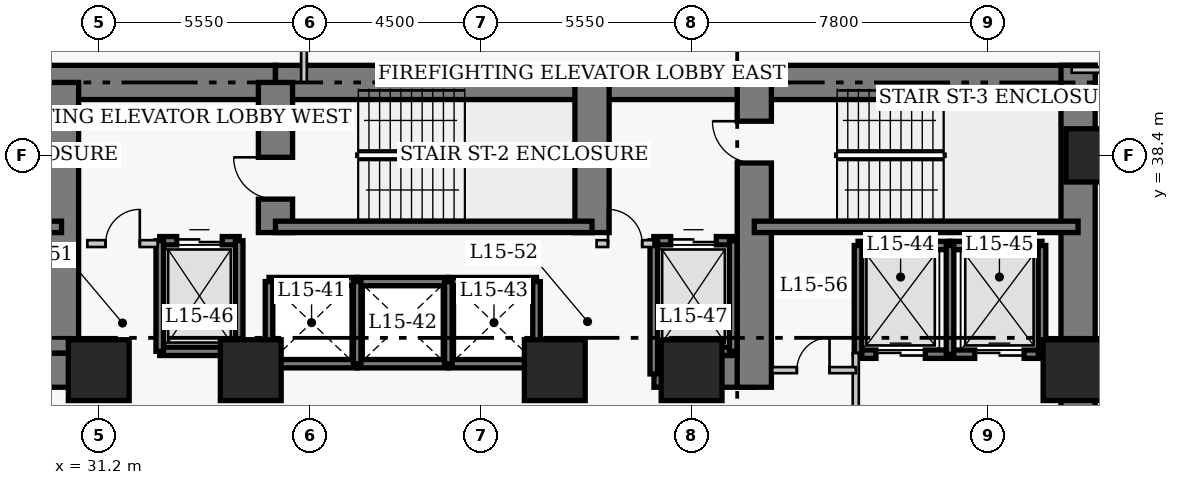
"""IFC4 building model, lengths in metres.
Left out: names, types, materials, properties, quantities, classifications, styles, units other than length and angle.
Written with IfcOpenShell. Run it as: python <this file> out.ifc"""

import sys

from ifc_helpers import new_model, si_unit, direction, frame, frame_2d, origin, origin_2d, place, context, subcontext, project, spatial, rectangle, extrude, element, fill, save


model = new_model("IFC4")
c1 = context("Model", 3, precision=1e-05, world=origin(), true_north=direction((0.0, 1.0)))
c2 = subcontext(c1, "Body", "Model", "MODEL_VIEW")
j1 = project(units=[si_unit("LENGTHUNIT", "METRE"), si_unit("PLANEANGLEUNIT", "RADIAN")], contexts=[c1])
p1 = place(None, origin())
s1 = spatial("IfcSite", under=j1, at=p1, CompositionType="ELEMENT")
p2 = place(p1, origin())
s2 = spatial("IfcBuilding", under=s1, at=p2, CompositionType="ELEMENT")
p3 = place(p2, frame((0.0, 0.0, 64.0)))
s3 = spatial("IfcBuildingStorey", under=s2, at=p3, CompositionType="ELEMENT", Elevation=64.0)
p4 = place(p3, frame((21.45, 40.32, 0.0), z_axis=(0.0, 0.0, 1.0), x_axis=(1.0, 0.0, 0.0)))
e1 = element("IfcWall", 1, at=p4, inside=s3, PredefinedType="SHEAR", context=c2, shape_type="SweptSolid", body=[
    extrude(rectangle(XDim=14.4, YDim=0.9, at=frame_2d((7.2, 0.0))), origin(), (0.0, 0.0, 1.0), 3.8),
])
p5 = place(p3, frame((35.85, 40.32, 0.0), z_axis=(0.0, 0.0, 1.0), x_axis=(1.0, 0.0, 0.0)))
e2 = element("IfcWall", 2, at=p5, inside=s3, PredefinedType="SHEAR", context=c2, shape_type="SweptSolid", body=[
    extrude(rectangle(XDim=12.6, YDim=0.9, at=frame_2d((6.3, 0.0))), origin(), (0.0, 0.0, 1.0), 3.8),
])
p6 = place(p3, frame((48.45, 40.32, 0.0), z_axis=(0.0, 0.0, 1.0), x_axis=(1.0, 0.0, 0.0)))
e3 = element("IfcWall", 3, at=p6, inside=s3, PredefinedType="SHEAR", context=c2, shape_type="SweptSolid", body=[
    extrude(rectangle(XDim=8.97, YDim=0.9, at=frame_2d((4.485, 0.0))), origin(), (0.0, 0.0, 1.0), 3.8),
])
p7 = place(p3, frame((56.97, 27.05, 0.0), z_axis=(0.0, 0.0, 1.0), x_axis=(0.0, 1.0, 0.0)))
e4 = element("IfcWall", 4, at=p7, inside=s3, PredefinedType="SHEAR", context=c2, shape_type="SweptSolid", body=[
    extrude(rectangle(XDim=13.72, YDim=0.9, at=frame_2d((6.86, 0.0))), origin(), (0.0, 0.0, 1.0), 3.8),
])
p8 = place(p3, frame((28.45, 32.75, 0.0), z_axis=(0.0, 0.0, 1.0), x_axis=(1.0, 0.0, 0.0)))
e5 = element("IfcWall", 5, at=p8, inside=s3, PredefinedType="SHEAR", context=c2, shape_type="SweptSolid", body=[
    extrude(rectangle(XDim=2.4, YDim=0.9, at=frame_2d((1.2, 0.0))), origin(), (0.0, 0.0, 1.0), 3.8),
])
p9 = place(p3, frame((45.81, 32.75, 0.0), z_axis=(0.0, 0.0, 1.0), x_axis=(1.0, 0.0, 0.0)))
e6 = element("IfcWall", 6, at=p9, inside=s3, PredefinedType="SHEAR", context=c2, shape_type="SweptSolid", body=[
    extrude(rectangle(XDim=2.64, YDim=0.9, at=frame_2d((1.32, 0.0))), origin(), (0.0, 0.0, 1.0), 3.8),
])
p10 = place(p3, frame((30.22, 33.2, 0.0), z_axis=(0.0, 0.0, 1.0), x_axis=(0.0, 1.0, 0.0)))
e7 = element("IfcWall", 7, at=p10, inside=s3, PredefinedType="SHEAR", context=c2, shape_type="SweptSolid", body=[
    extrude(rectangle(XDim=7.12, YDim=0.9, at=frame_2d((3.56, 0.0))), origin(), (0.0, 0.0, 1.0), 3.8),
])
p11 = place(p3, frame((35.85, 36.37, 0.0), z_axis=(0.0, 0.0, 1.0), x_axis=(0.0, 1.0, 0.0)))
e8 = element("IfcWall", 8, at=p11, inside=s3, PredefinedType="SHEAR", context=c2, shape_type="SweptSolid", body=[
    extrude(rectangle(XDim=3.95, YDim=0.9, at=frame_2d((1.975, 0.0))), origin(), (0.0, 0.0, 1.0), 3.8),
])
p12 = place(p11, frame((0.88, 0.0, 0.0)))
e9 = element("IfcOpeningElement", 9, at=p12, cuts=e8, PredefinedType="OPENING", context=c2, shape_type="SweptSolid", body=[
    extrude(rectangle(XDim=1.1, YDim=2.15, at=frame_2d((0.55, 1.075))), frame((0.0, 0.46, 0.0), z_axis=(0.0, -1.0, 0.0), x_axis=(1.0, 0.0, 0.0)), (0.0, 0.0, 1.0), 0.92),
])
p13 = place(p3, frame((44.18, 36.37, 0.0), z_axis=(0.0, 0.0, 1.0), x_axis=(0.0, 1.0, 0.0)))
e10 = element("IfcWall", 10, at=p13, inside=s3, PredefinedType="SHEAR", context=c2, shape_type="SweptSolid", body=[
    extrude(rectangle(XDim=3.95, YDim=0.9, at=frame_2d((1.975, 0.0))), origin(), (0.0, 0.0, 1.0), 3.8),
])
p14 = place(p3, frame((48.45, 32.3, 0.0), z_axis=(0.0, 0.0, 1.0), x_axis=(0.0, 1.0, 0.0)))
e11 = element("IfcWall", 11, at=p14, inside=s3, PredefinedType="SHEAR", context=c2, shape_type="SweptSolid", body=[
    extrude(rectangle(XDim=8.02, YDim=0.9, at=frame_2d((4.01, 0.0))), origin(), (0.0, 0.0, 1.0), 3.8),
])
p15 = place(p14, frame((5.9, 0.0, 0.0)))
e12 = element("IfcOpeningElement", 12, at=p15, cuts=e11, PredefinedType="OPENING", context=c2, shape_type="SweptSolid", body=[
    extrude(rectangle(XDim=1.1, YDim=2.15, at=frame_2d((0.55, 1.075))), frame((0.0, 0.46, 0.0), z_axis=(0.0, -1.0, 0.0), x_axis=(1.0, 0.0, 0.0)), (0.0, 0.0, 1.0), 0.92),
])
p16 = place(p3, frame((21.9, 36.52, 0.0), z_axis=(0.0, 0.0, 1.0), x_axis=(1.0, 0.0, 0.0)))
e13 = element("IfcWall", 13, at=p16, inside=s3, PredefinedType="SHEAR", context=c2, shape_type="SweptSolid", body=[
    extrude(rectangle(XDim=8.32, YDim=0.3, at=frame_2d((4.16, 0.0))), origin(), (0.0, 0.0, 1.0), 3.8),
])
p17 = place(p16, frame((0.9, 0.0, 0.0)))
e14 = element("IfcOpeningElement", 14, at=p17, cuts=e13, PredefinedType="OPENING", context=c2, shape_type="SweptSolid", body=[
    extrude(rectangle(XDim=1.1, YDim=2.15, at=frame_2d((0.55, 1.075))), frame((0.0, 0.16, 0.0), z_axis=(0.0, -1.0, 0.0), x_axis=(1.0, 0.0, 0.0)), (0.0, 0.0, 1.0), 0.32),
])
p18 = place(p3, frame((35.85, 36.52, 0.0), z_axis=(0.0, 0.0, 1.0), x_axis=(1.0, 0.0, 0.0)))
e15 = element("IfcWall", 15, at=p18, inside=s3, PredefinedType="SHEAR", context=c2, shape_type="SweptSolid", body=[
    extrude(rectangle(XDim=8.33, YDim=0.3, at=frame_2d((4.165, 0.0))), origin(), (0.0, 0.0, 1.0), 3.8),
])
p19 = place(p3, frame((48.45, 36.52, 0.0), z_axis=(0.0, 0.0, 1.0), x_axis=(1.0, 0.0, 0.0)))
e16 = element("IfcWall", 16, at=p19, inside=s3, PredefinedType="SHEAR", context=c2, shape_type="SweptSolid", body=[
    extrude(rectangle(XDim=8.52, YDim=0.3, at=frame_2d((4.26, 0.0))), origin(), (0.0, 0.0, 1.0), 3.8),
])
p20 = place(p3, frame((57.35, 38.4, 0.0), z_axis=(0.0, 0.0, 1.0), x_axis=(1.0, 0.0, 0.0)))
e17 = element("IfcColumn", 17, at=p20, inside=s3, PredefinedType="COLUMN", context=c2, shape_type="SweptSolid", body=[
    extrude(rectangle(XDim=1.4, YDim=1.4, at=origin_2d()), origin(), (0.0, 0.0, 1.0), 3.8),
])
for number, where, z_axis, x_axis in (
    (18, (31.2, 32.75, 0.0), (0.0, 0.0, 1.0), (1.0, 0.0, 0.0)),
    (19, (35.2, 32.75, 0.0), (0.0, 0.0, 1.0), (1.0, 0.0, 0.0)),
    (20, (43.2, 32.75, 0.0), (0.0, 0.0, 1.0), (1.0, 0.0, 0.0)),
    (21, (46.8, 32.75, 0.0), (0.0, 0.0, 1.0), (1.0, 0.0, 0.0)),
    (22, (56.85, 32.75, 0.0), (0.0, 0.0, 1.0), (1.0, 0.0, 0.0)),
):
    element("IfcColumn", number, at=place(p3, frame(where, z_axis=z_axis, x_axis=x_axis)), inside=s3, PredefinedType="COLUMN", context=c2, shape_type="SweptSolid", body=[
        extrude(rectangle(XDim=1.6, YDim=1.6, at=origin_2d()), origin(), (0.0, 0.0, 1.0), 3.8),
    ])
for number, where, z_axis, x_axis in (
    (23, (35.68, 35.08, 0.0), (0.0, 0.0, 1.0), (1.0, 0.0, 0.0)),
    (24, (35.68, 32.92, 0.0), (0.0, 0.0, 1.0), (1.0, 0.0, 0.0)),
):
    element("IfcWall", number, at=place(p3, frame(where, z_axis=z_axis, x_axis=x_axis)), inside=s3, PredefinedType="SHEAR", context=c2, shape_type="SweptSolid", body=[
        extrude(rectangle(XDim=2.32, YDim=0.22, at=frame_2d((1.16, 0.0))), origin(), (0.0, 0.0, 1.0), 3.8),
    ])
p21 = place(p3, frame((35.68, 32.92, 0.0), z_axis=(0.0, 0.0, 1.0), x_axis=(0.0, 1.0, 0.0)))
e25 = element("IfcWall", 25, at=p21, inside=s3, PredefinedType="SHEAR", context=c2, shape_type="SweptSolid", body=[
    extrude(rectangle(XDim=2.16, YDim=0.2, at=frame_2d((1.08, 0.0))), origin(), (0.0, 0.0, 1.0), 3.8),
])
for number, where, z_axis, x_axis in (
    (26, (38.0, 35.08, 0.0), (0.0, 0.0, 1.0), (1.0, 0.0, 0.0)),
    (27, (38.0, 32.92, 0.0), (0.0, 0.0, 1.0), (1.0, 0.0, 0.0)),
):
    element("IfcWall", number, at=place(p3, frame(where, z_axis=z_axis, x_axis=x_axis)), inside=s3, PredefinedType="SHEAR", context=c2, shape_type="SweptSolid", body=[
        extrude(rectangle(XDim=2.4, YDim=0.22, at=frame_2d((1.2, 0.0))), origin(), (0.0, 0.0, 1.0), 3.8),
    ])
p22 = place(p3, frame((38.0, 32.92, 0.0), z_axis=(0.0, 0.0, 1.0), x_axis=(0.0, 1.0, 0.0)))
e28 = element("IfcWall", 28, at=p22, inside=s3, PredefinedType="SHEAR", context=c2, shape_type="SweptSolid", body=[
    extrude(rectangle(XDim=2.16, YDim=0.2, at=frame_2d((1.08, 0.0))), origin(), (0.0, 0.0, 1.0), 3.8),
])
for number, where, z_axis, x_axis in (
    (29, (40.4, 35.08, 0.0), (0.0, 0.0, 1.0), (1.0, 0.0, 0.0)),
    (30, (40.4, 32.92, 0.0), (0.0, 0.0, 1.0), (1.0, 0.0, 0.0)),
):
    element("IfcWall", number, at=place(p3, frame(where, z_axis=z_axis, x_axis=x_axis)), inside=s3, PredefinedType="SHEAR", context=c2, shape_type="SweptSolid", body=[
        extrude(rectangle(XDim=2.32, YDim=0.22, at=frame_2d((1.16, 0.0))), origin(), (0.0, 0.0, 1.0), 3.8),
    ])
for number, where, z_axis, x_axis in (
    (31, (40.4, 32.92, 0.0), (0.0, 0.0, 1.0), (0.0, 1.0, 0.0)),
    (32, (42.72, 32.92, 0.0), (0.0, 0.0, 1.0), (0.0, 1.0, 0.0)),
):
    element("IfcWall", number, at=place(p3, frame(where, z_axis=z_axis, x_axis=x_axis)), inside=s3, PredefinedType="SHEAR", context=c2, shape_type="SweptSolid", body=[
        extrude(rectangle(XDim=2.16, YDim=0.2, at=frame_2d((1.08, 0.0))), origin(), (0.0, 0.0, 1.0), 3.8),
    ])
p23 = place(p3, frame((51.18, 36.03, 0.0), z_axis=(0.0, 0.0, 1.0), x_axis=(1.0, 0.0, 0.0)))
e33 = element("IfcWall", 33, at=p23, inside=s3, PredefinedType="SHEAR", context=c2, shape_type="SweptSolid", body=[
    extrude(rectangle(XDim=2.42, YDim=0.22, at=frame_2d((1.21, 0.0))), origin(), (0.0, 0.0, 1.0), 3.8),
])
p24 = place(p3, frame((51.18, 33.17, 0.0), z_axis=(0.0, 0.0, 1.0), x_axis=(1.0, 0.0, 0.0)))
e34 = element("IfcWall", 34, at=p24, inside=s3, PredefinedType="SHEAR", context=c2, shape_type="SweptSolid", body=[
    extrude(rectangle(XDim=2.42, YDim=0.22, at=frame_2d((1.21, 0.0))), origin(), (0.0, 0.0, 1.0), 3.8),
])
p25 = place(p24, frame((0.47, 0.0, 0.0)))
e35 = element("IfcOpeningElement", 35, at=p25, cuts=e34, PredefinedType="OPENING", context=c2, shape_type="SweptSolid", body=[
    extrude(rectangle(XDim=1.3, YDim=2.15, at=frame_2d((0.65, 1.075))), frame((0.0, 0.12, 0.0), z_axis=(0.0, -1.0, 0.0), x_axis=(1.0, 0.0, 0.0)), (0.0, 0.0, 1.0), 0.24),
])
p26 = place(p3, frame((51.18, 33.17, 0.0), z_axis=(0.0, 0.0, 1.0), x_axis=(0.0, 1.0, 0.0)))
e36 = element("IfcWall", 36, at=p26, inside=s3, PredefinedType="SHEAR", context=c2, shape_type="SweptSolid", body=[
    extrude(rectangle(XDim=2.86, YDim=0.2, at=frame_2d((1.43, 0.0))), origin(), (0.0, 0.0, 1.0), 3.8),
])
p27 = place(p3, frame((53.6, 36.03, 0.0), z_axis=(0.0, 0.0, 1.0), x_axis=(1.0, 0.0, 0.0)))
e37 = element("IfcWall", 37, at=p27, inside=s3, PredefinedType="SHEAR", context=c2, shape_type="SweptSolid", body=[
    extrude(rectangle(XDim=2.42, YDim=0.22, at=frame_2d((1.21, 0.0))), origin(), (0.0, 0.0, 1.0), 3.8),
])
p28 = place(p3, frame((53.6, 33.17, 0.0), z_axis=(0.0, 0.0, 1.0), x_axis=(1.0, 0.0, 0.0)))
e38 = element("IfcWall", 38, at=p28, inside=s3, PredefinedType="SHEAR", context=c2, shape_type="SweptSolid", body=[
    extrude(rectangle(XDim=2.42, YDim=0.22, at=frame_2d((1.21, 0.0))), origin(), (0.0, 0.0, 1.0), 3.8),
])
p29 = place(p28, frame((0.65, 0.0, 0.0)))
e39 = element("IfcOpeningElement", 39, at=p29, cuts=e38, PredefinedType="OPENING", context=c2, shape_type="SweptSolid", body=[
    extrude(rectangle(XDim=1.3, YDim=2.15, at=frame_2d((0.65, 1.075))), frame((0.0, 0.12, 0.0), z_axis=(0.0, -1.0, 0.0), x_axis=(1.0, 0.0, 0.0)), (0.0, 0.0, 1.0), 0.24),
])
for number, where, z_axis, x_axis in (
    (40, (53.6, 33.17, 0.0), (0.0, 0.0, 1.0), (0.0, 1.0, 0.0)),
    (41, (56.02, 33.17, 0.0), (0.0, 0.0, 1.0), (0.0, 1.0, 0.0)),
):
    element("IfcWall", number, at=place(p3, frame(where, z_axis=z_axis, x_axis=x_axis)), inside=s3, PredefinedType="SHEAR", context=c2, shape_type="SweptSolid", body=[
        extrude(rectangle(XDim=2.86, YDim=0.2, at=frame_2d((1.43, 0.0))), origin(), (0.0, 0.0, 1.0), 3.8),
    ])
p30 = place(p3, frame((32.805, 36.155, 0.0), z_axis=(0.0, 0.0, 1.0), x_axis=(1.0, 0.0, 0.0)))
e42 = element("IfcWall", 42, at=p30, inside=s3, PredefinedType="SHEAR", context=c2, shape_type="SweptSolid", body=[
    extrude(rectangle(XDim=2.09, YDim=0.22, at=frame_2d((1.045, 0.0))), origin(), (0.0, 0.0, 1.0), 3.8),
])
p31 = place(p30, frame((0.445, 0.0, 0.0)))
e43 = element("IfcOpeningElement", 43, at=p31, cuts=e42, PredefinedType="OPENING", context=c2, shape_type="SweptSolid", body=[
    extrude(rectangle(XDim=1.2, YDim=2.15, at=frame_2d((0.6, 1.075))), frame((0.0, 0.12, 0.0), z_axis=(0.0, -1.0, 0.0), x_axis=(1.0, 0.0, 0.0)), (0.0, 0.0, 1.0), 0.24),
])
p32 = place(p3, frame((32.805, 33.245, 0.0), z_axis=(0.0, 0.0, 1.0), x_axis=(1.0, 0.0, 0.0)))
e44 = element("IfcWall", 44, at=p32, inside=s3, PredefinedType="SHEAR", context=c2, shape_type="SweptSolid", body=[
    extrude(rectangle(XDim=2.09, YDim=0.22, at=frame_2d((1.045, 0.0))), origin(), (0.0, 0.0, 1.0), 3.8),
])
for number, where, z_axis, x_axis in (
    (45, (32.805, 33.245, 0.0), (0.0, 0.0, 1.0), (0.0, 1.0, 0.0)),
    (46, (34.895, 33.245, 0.0), (0.0, 0.0, 1.0), (0.0, 1.0, 0.0)),
):
    element("IfcWall", number, at=place(p3, frame(where, z_axis=z_axis, x_axis=x_axis)), inside=s3, PredefinedType="SHEAR", context=c2, shape_type="SweptSolid", body=[
        extrude(rectangle(XDim=2.91, YDim=0.2, at=frame_2d((1.455, 0.0))), origin(), (0.0, 0.0, 1.0), 3.8),
    ])
p33 = place(p3, frame((45.805, 36.155, 0.0), z_axis=(0.0, 0.0, 1.0), x_axis=(1.0, 0.0, 0.0)))
e47 = element("IfcWall", 47, at=p33, inside=s3, PredefinedType="SHEAR", context=c2, shape_type="SweptSolid", body=[
    extrude(rectangle(XDim=2.09, YDim=0.22, at=frame_2d((1.045, 0.0))), origin(), (0.0, 0.0, 1.0), 3.8),
])
p34 = place(p33, frame((0.445, 0.0, 0.0)))
e48 = element("IfcOpeningElement", 48, at=p34, cuts=e47, PredefinedType="OPENING", context=c2, shape_type="SweptSolid", body=[
    extrude(rectangle(XDim=1.2, YDim=2.15, at=frame_2d((0.6, 1.075))), frame((0.0, 0.12, 0.0), z_axis=(0.0, -1.0, 0.0), x_axis=(1.0, 0.0, 0.0)), (0.0, 0.0, 1.0), 0.24),
])
p35 = place(p3, frame((45.805, 33.245, 0.0), z_axis=(0.0, 0.0, 1.0), x_axis=(1.0, 0.0, 0.0)))
e49 = element("IfcWall", 49, at=p35, inside=s3, PredefinedType="SHEAR", context=c2, shape_type="SweptSolid", body=[
    extrude(rectangle(XDim=2.09, YDim=0.22, at=frame_2d((1.045, 0.0))), origin(), (0.0, 0.0, 1.0), 3.8),
])
p36 = place(p3, frame((45.805, 32.65, 0.0), z_axis=(0.0, 0.0, 1.0), x_axis=(0.0, 1.0, 0.0)))
e50 = element("IfcWall", 50, at=p36, inside=s3, PredefinedType="SHEAR", context=c2, shape_type="SweptSolid", body=[
    extrude(rectangle(XDim=3.505, YDim=0.2, at=frame_2d((1.752, 0.0))), origin(), (0.0, 0.0, 1.0), 3.8),
])
p37 = place(p3, frame((47.895, 33.245, 0.0), z_axis=(0.0, 0.0, 1.0), x_axis=(0.0, 1.0, 0.0)))
e51 = element("IfcWall", 51, at=p37, inside=s3, PredefinedType="SHEAR", context=c2, shape_type="SweptSolid", body=[
    extrude(rectangle(XDim=2.91, YDim=0.2, at=frame_2d((1.455, 0.0))), origin(), (0.0, 0.0, 1.0), 3.8),
])
p38 = place(p3, frame((30.9, 36.08, 0.0), z_axis=(0.0, 0.0, 1.0), x_axis=(1.0, 0.0, 0.0)))
e52 = element("IfcWall", 52, at=p38, inside=s3, PredefinedType="PARTITIONING", context=c2, shape_type="SweptSolid", body=[
    extrude(rectangle(XDim=1.85, YDim=0.18, at=frame_2d((0.925, 0.0))), origin(), (0.0, 0.0, 1.0), 3.54),
])
p39 = place(p38, frame((0.48, 0.0, 0.0)))
e53 = element("IfcOpeningElement", 53, at=p39, cuts=e52, PredefinedType="OPENING", context=c2, shape_type="SweptSolid", body=[
    extrude(rectangle(XDim=0.9, YDim=2.15, at=frame_2d((0.45, 1.075))), frame((0.0, 0.1, 0.0), z_axis=(0.0, -1.0, 0.0), x_axis=(1.0, 0.0, 0.0)), (0.0, 0.0, 1.0), 0.2),
])
p40 = place(p3, frame((44.3, 36.08, 0.0), z_axis=(0.0, 0.0, 1.0), x_axis=(1.0, 0.0, 0.0)))
e54 = element("IfcWall", 54, at=p40, inside=s3, PredefinedType="PARTITIONING", context=c2, shape_type="SweptSolid", body=[
    extrude(rectangle(XDim=1.5, YDim=0.18, at=frame_2d((0.75, 0.0))), origin(), (0.0, 0.0, 1.0), 3.54),
])
p41 = place(p40, frame((0.3, 0.0, 0.0)))
e55 = element("IfcOpeningElement", 55, at=p41, cuts=e54, PredefinedType="OPENING", context=c2, shape_type="SweptSolid", body=[
    extrude(rectangle(XDim=0.9, YDim=2.15, at=frame_2d((0.45, 1.075))), frame((0.0, 0.1, 0.0), z_axis=(0.0, -1.0, 0.0), x_axis=(1.0, 0.0, 0.0)), (0.0, 0.0, 1.0), 0.2),
])
p42 = place(p3, frame((51.12, 29.5, 0.0), z_axis=(0.0, 0.0, 1.0), x_axis=(0.0, 1.0, 0.0)))
e56 = element("IfcWall", 56, at=p42, inside=s3, PredefinedType="PARTITIONING", context=c2, shape_type="SweptSolid", body=[
    extrude(rectangle(XDim=3.7, YDim=0.16, at=frame_2d((1.85, 0.0))), origin(), (0.0, 0.0, 1.0), 3.54),
])
p43 = place(p42, frame((0.9, 0.0, 0.0)))
e57 = element("IfcOpeningElement", 57, at=p43, cuts=e56, PredefinedType="OPENING", context=c2, shape_type="SweptSolid", body=[
    extrude(rectangle(XDim=1.1, YDim=2.15, at=frame_2d((0.55, 1.075))), frame((0.0, 0.09, 0.0), z_axis=(0.0, -1.0, 0.0), x_axis=(1.0, 0.0, 0.0)), (0.0, 0.0, 1.0), 0.18),
])
p44 = place(p3, frame((48.92, 32.75, 0.0), z_axis=(0.0, 0.0, 1.0), x_axis=(1.0, 0.0, 0.0)))
e58 = element("IfcWall", 58, at=p44, inside=s3, PredefinedType="PARTITIONING", context=c2, shape_type="SweptSolid", body=[
    extrude(rectangle(XDim=2.2, YDim=0.16, at=frame_2d((1.1, 0.0))), origin(), (0.0, 0.0, 1.0), 3.54),
])
p45 = place(p44, frame((0.65, 0.0, 0.0)))
e59 = element("IfcOpeningElement", 59, at=p45, cuts=e58, PredefinedType="OPENING", context=c2, shape_type="SweptSolid", body=[
    extrude(rectangle(XDim=0.86, YDim=2.05, at=frame_2d((0.43, 1.025))), frame((0.0, 0.09, 0.0), z_axis=(0.0, -1.0, 0.0), x_axis=(1.0, 0.0, 0.0)), (0.0, 0.0, 1.0), 0.18),
])
p46 = place(p3, frame((56.8, 40.65, 0.0), z_axis=(0.0, 0.0, 1.0), x_axis=(1.0, 0.0, 0.0)))
e60 = element("IfcWall", 60, at=p46, inside=s3, PredefinedType="PARTITIONING", context=c2, shape_type="SweptSolid", body=[
    extrude(rectangle(XDim=4.36, YDim=0.15, at=frame_2d((2.18, 0.0))), origin(), (0.0, 0.0, 1.0), 3.54),
])
p47 = place(p46, frame((2.75, 0.0, 0.0)))
e61 = element("IfcOpeningElement", 61, at=p47, cuts=e60, PredefinedType="OPENING", context=c2, shape_type="SweptSolid", body=[
    extrude(rectangle(XDim=1.0, YDim=2.15, at=frame_2d((0.5, 1.075))), frame((0.0, 0.085, 0.0), z_axis=(0.0, -1.0, 0.0), x_axis=(1.0, 0.0, 0.0)), (0.0, 0.0, 1.0), 0.17),
])
p48 = place(p3, frame((36.6, 40.32, 0.0), z_axis=(0.0, 0.0, 1.0), x_axis=(0.0, 1.0, 0.0)))
e62 = element("IfcWall", 62, at=p48, inside=s3, PredefinedType="PARTITIONING", context=c2, shape_type="SweptSolid", body=[
    extrude(rectangle(XDim=5.045, YDim=0.15, at=frame_2d((2.522, 0.0))), origin(), (0.0, 0.0, 1.0), 3.54),
])
p49 = place(p25, origin())
e63 = element("IfcDoor", 63, at=p49, inside=s3, OperationType="DOUBLE_DOOR_SLIDING", PredefinedType="DOOR", context=c2, shape_type="SweptSolid", body=[
    extrude(rectangle(XDim=1.3, YDim=2.15, at=frame_2d((0.65, 1.075))), frame((0.0, 0.025, 0.0), z_axis=(0.0, -1.0, 0.0), x_axis=(1.0, 0.0, 0.0)), (0.0, 0.0, 1.0), 0.05),
])
fill(e35, e63)
p50 = place(p29, origin())
e64 = element("IfcDoor", 64, at=p50, inside=s3, OperationType="DOUBLE_DOOR_SLIDING", PredefinedType="DOOR", context=c2, shape_type="SweptSolid", body=[
    extrude(rectangle(XDim=1.3, YDim=2.15, at=frame_2d((0.65, 1.075))), frame((0.0, 0.025, 0.0), z_axis=(0.0, -1.0, 0.0), x_axis=(1.0, 0.0, 0.0)), (0.0, 0.0, 1.0), 0.05),
])
fill(e39, e64)
p51 = place(p31, origin())
e65 = element("IfcDoor", 65, at=p51, inside=s3, OperationType="DOUBLE_DOOR_SLIDING", PredefinedType="DOOR", context=c2, shape_type="SweptSolid", body=[
    extrude(rectangle(XDim=1.2, YDim=2.15, at=frame_2d((0.6, 1.075))), frame((0.0, 0.025, 0.0), z_axis=(0.0, -1.0, 0.0), x_axis=(1.0, 0.0, 0.0)), (0.0, 0.0, 1.0), 0.05),
])
fill(e43, e65)
p52 = place(p34, origin())
e66 = element("IfcDoor", 66, at=p52, inside=s3, OperationType="DOUBLE_DOOR_SLIDING", PredefinedType="DOOR", context=c2, shape_type="SweptSolid", body=[
    extrude(rectangle(XDim=1.2, YDim=2.15, at=frame_2d((0.6, 1.075))), frame((0.0, 0.025, 0.0), z_axis=(0.0, -1.0, 0.0), x_axis=(1.0, 0.0, 0.0)), (0.0, 0.0, 1.0), 0.05),
])
fill(e48, e66)
p53 = place(p39, origin())
e67 = element("IfcDoor", 67, at=p53, inside=s3, OperationType="SINGLE_SWING_RIGHT", PredefinedType="DOOR", context=c2, shape_type="SweptSolid", body=[
    extrude(rectangle(XDim=0.9, YDim=2.15, at=frame_2d((0.45, 1.075))), frame((0.0, 0.025, 0.0), z_axis=(0.0, -1.0, 0.0), x_axis=(1.0, 0.0, 0.0)), (0.0, 0.0, 1.0), 0.05),
])
fill(e53, e67)
p54 = place(p41, origin())
e68 = element("IfcDoor", 68, at=p54, inside=s3, OperationType="SINGLE_SWING_LEFT", PredefinedType="DOOR", context=c2, shape_type="SweptSolid", body=[
    extrude(rectangle(XDim=0.9, YDim=2.15, at=frame_2d((0.45, 1.075))), frame((0.0, 0.025, 0.0), z_axis=(0.0, -1.0, 0.0), x_axis=(1.0, 0.0, 0.0)), (0.0, 0.0, 1.0), 0.05),
])
fill(e55, e68)
p55 = place(p45, origin())
e69 = element("IfcDoor", 69, at=p55, inside=s3, OperationType="SINGLE_SWING_RIGHT", PredefinedType="DOOR", context=c2, shape_type="SweptSolid", body=[
    extrude(rectangle(XDim=0.86, YDim=2.05, at=frame_2d((0.43, 1.025))), frame((0.0, 0.025, 0.0), z_axis=(0.0, -1.0, 0.0), x_axis=(1.0, 0.0, 0.0)), (0.0, 0.0, 1.0), 0.05),
])
fill(e59, e69)
p56 = place(p12, origin())
e70 = element("IfcDoor", 70, at=p56, inside=s3, OperationType="SINGLE_SWING_RIGHT", PredefinedType="DOOR", context=c2, shape_type="SweptSolid", body=[
    extrude(rectangle(XDim=1.1, YDim=2.15, at=frame_2d((0.55, 1.075))), frame((0.0, 0.025, 0.0), z_axis=(0.0, -1.0, 0.0), x_axis=(1.0, 0.0, 0.0)), (0.0, 0.0, 1.0), 0.05),
])
fill(e9, e70)
p57 = place(p15, origin())
e71 = element("IfcDoor", 71, at=p57, inside=s3, OperationType="SINGLE_SWING_RIGHT", PredefinedType="DOOR", context=c2, shape_type="SweptSolid", body=[
    extrude(rectangle(XDim=1.1, YDim=2.15, at=frame_2d((0.55, 1.075))), frame((0.0, 0.025, 0.0), z_axis=(0.0, -1.0, 0.0), x_axis=(1.0, 0.0, 0.0)), (0.0, 0.0, 1.0), 0.05),
])
fill(e12, e71)
save(model, sys.argv[1])
